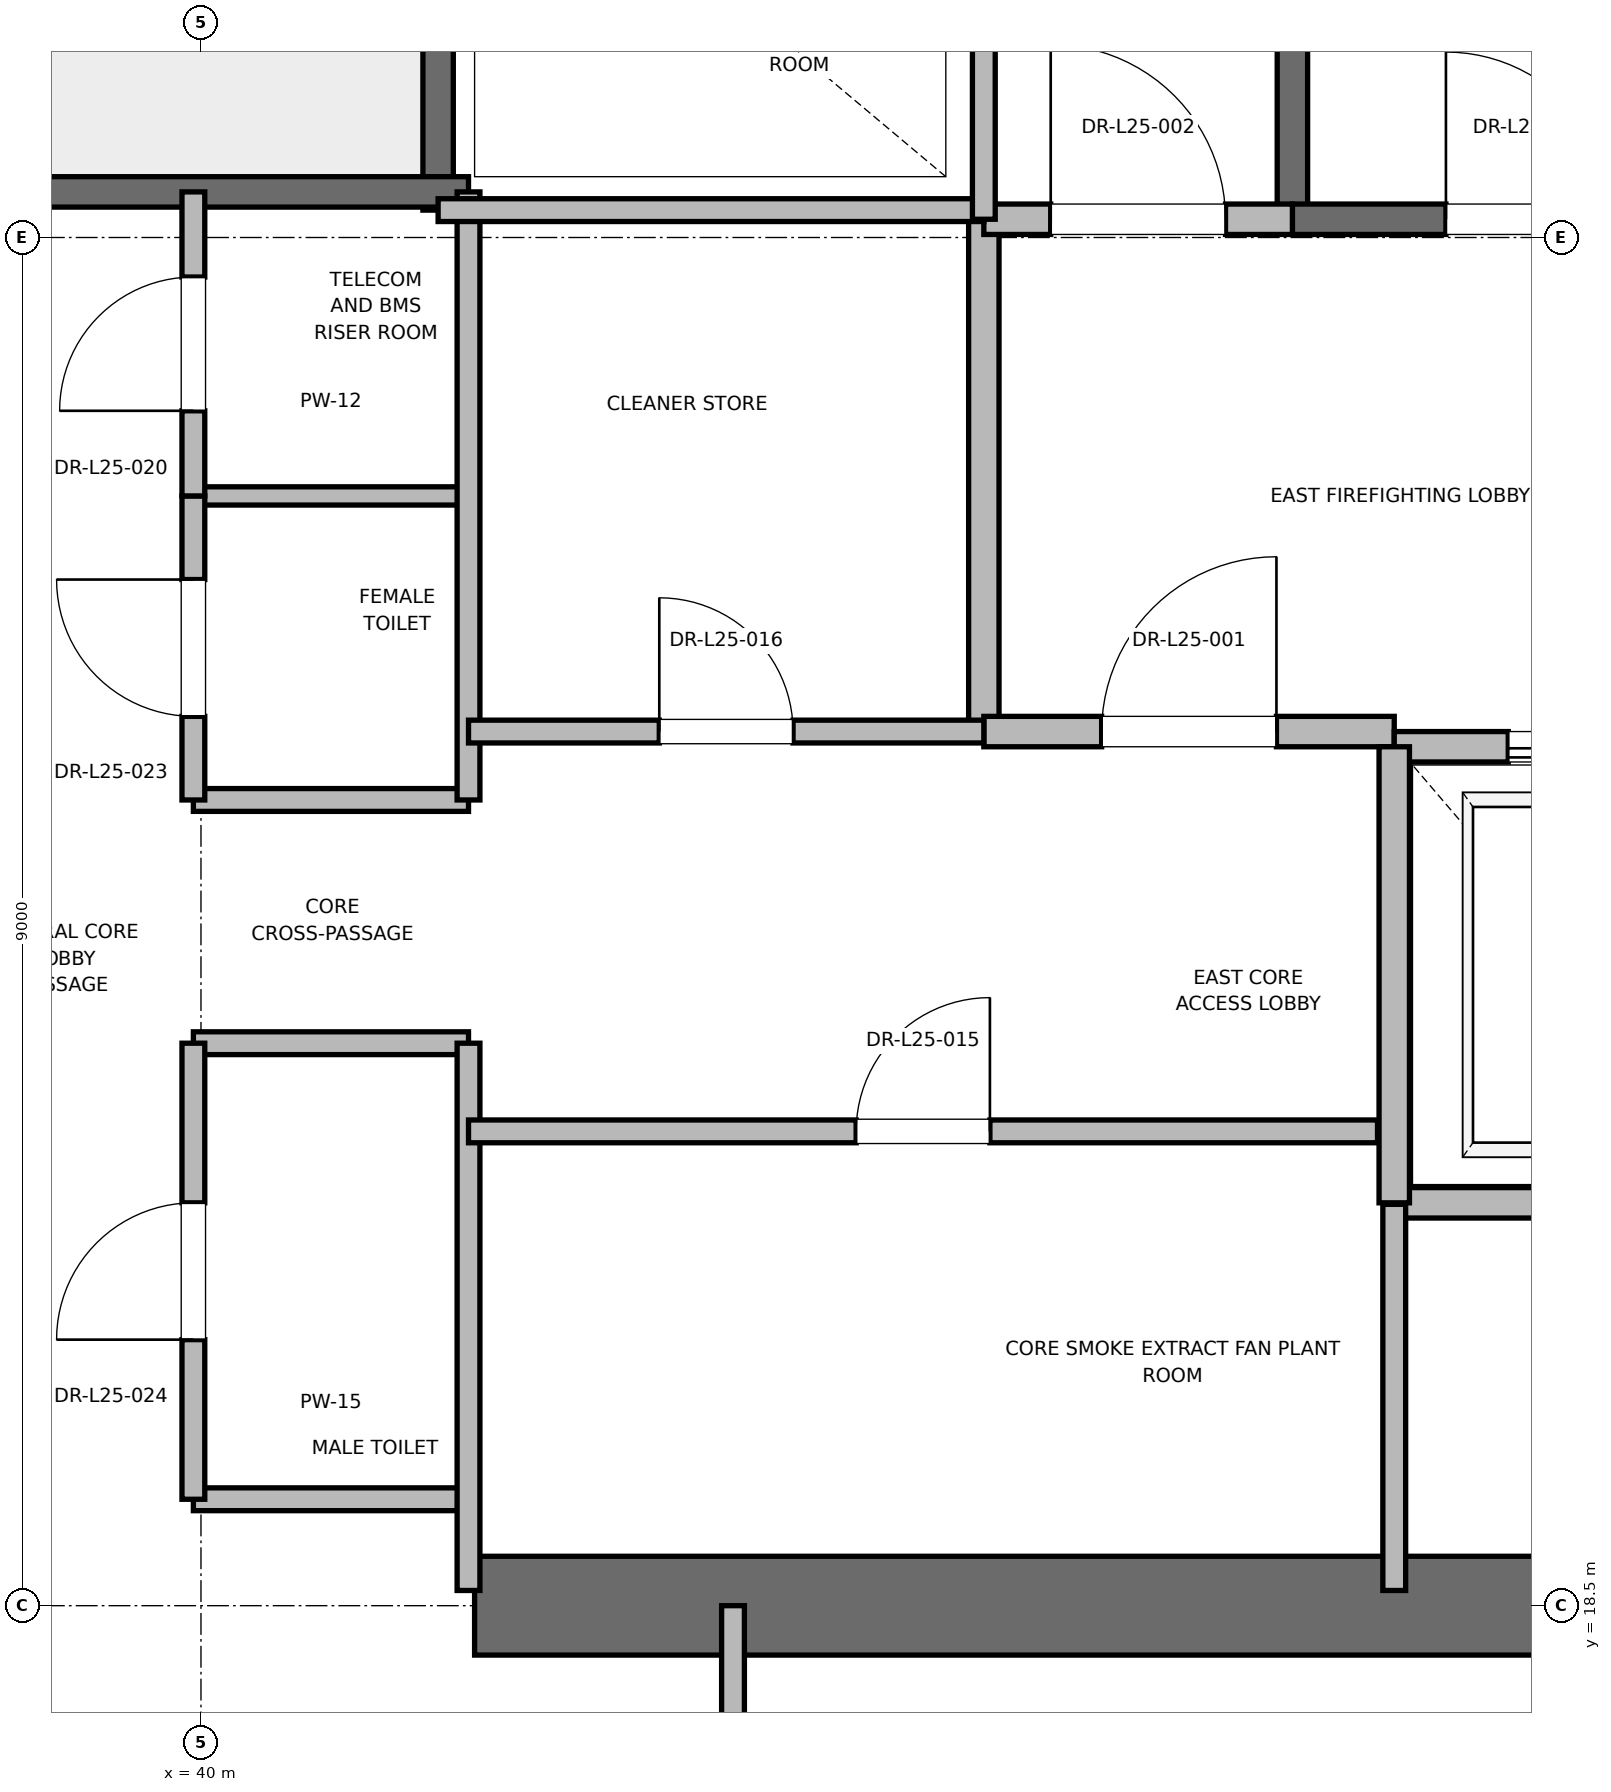
"""IFC4 building model, lengths in metres.
Left out: names, types, materials, properties, quantities, classifications, styles, units other than length and angle.
Written with IfcOpenShell. Run it as: python <this file> out.ifc"""

import sys

from ifc_helpers import new_model, si_unit, direction, frame, frame_2d, origin, place, context, subcontext, project, spatial, rectangle, extrude, element, fill, save


model = new_model("IFC4")
c1 = context("Model", 3, precision=1e-05, world=origin(), true_north=direction((0.0, 1.0)))
c2 = subcontext(c1, "Body", "Model", "MODEL_VIEW")
j1 = project(units=[si_unit("LENGTHUNIT", "METRE"), si_unit("PLANEANGLEUNIT", "RADIAN")], contexts=[c1])
p1 = place(None, origin())
s1 = spatial("IfcSite", under=j1, at=p1, CompositionType="ELEMENT")
p2 = place(p1, origin())
s2 = spatial("IfcBuilding", under=s1, at=p2, CompositionType="ELEMENT")
p3 = place(p2, frame((0.0, 0.0, 107.6)))
s3 = spatial("IfcBuildingStorey", under=s2, at=p3, CompositionType="ELEMENT", Elevation=107.6)
p4 = place(p3, frame((41.8, 18.5, 0.0), z_axis=(0.0, 0.0, 1.0), x_axis=(1.0, 0.0, 0.0)))
e1 = element("IfcWall", 1, at=p4, inside=s3, PredefinedType="SHEAR", context=c2, shape_type="SweptSolid", body=[
    extrude(rectangle(XDim=9.2, YDim=0.65, at=frame_2d((4.6, 0.0))), origin(), (0.0, 0.0, 1.0), 5.1),
])
p5 = place(p3, frame((47.18, 27.62, 0.0), z_axis=(0.0, 0.0, 1.0), x_axis=(0.0, 1.0, 0.0)))
e2 = element("IfcWall", 2, at=p5, inside=s3, PredefinedType="SOLIDWALL", context=c2, shape_type="SweptSolid", body=[
    extrude(rectangle(XDim=8.18, YDim=0.2, at=frame_2d((4.09, 0.0))), origin(), (0.0, 0.0, 1.0), 5.1),
])
p6 = place(p3, frame((47.18, 27.62, 0.0), z_axis=(0.0, 0.0, 1.0), x_axis=(1.0, 0.0, 0.0)))
e3 = element("IfcWall", 3, at=p6, inside=s3, PredefinedType="SOLIDWALL", context=c2, shape_type="SweptSolid", body=[
    extrude(rectangle(XDim=3.12, YDim=0.2, at=frame_2d((1.56, 0.0))), origin(), (0.0, 0.0, 1.0), 5.1),
])
p7 = place(p6, frame((1.01, 0.0, 0.0)))
e4 = element("IfcOpeningElement", 4, at=p7, cuts=e3, PredefinedType="OPENING", context=c2, shape_type="SweptSolid", body=[
    extrude(rectangle(XDim=1.1, YDim=2.15, at=frame_2d((0.55, 1.075))), frame((0.0, 0.1, 0.0), z_axis=(0.0, -1.0, 0.0), x_axis=(1.0, 0.0, 0.0)), (0.0, 0.0, 1.0), 0.2),
])
p8 = place(p3, frame((41.56, 27.68, 0.0), z_axis=(0.0, 0.0, 1.0), x_axis=(0.0, 1.0, 0.0)))
e5 = element("IfcWall", 5, at=p8, inside=s3, PredefinedType="SOLIDWALL", context=c2, shape_type="SweptSolid", body=[
    extrude(rectangle(XDim=8.57, YDim=0.2, at=frame_2d((4.285, 0.0))), origin(), (0.0, 0.0, 1.0), 5.1),
])
p9 = place(p3, frame((38.44, 27.8, 0.0), z_axis=(0.0, 0.0, 1.0), x_axis=(1.0, 0.0, 0.0)))
e6 = element("IfcWall", 6, at=p9, inside=s3, PredefinedType="SOLIDWALL", context=c2, shape_type="SweptSolid", body=[
    extrude(rectangle(XDim=3.32, YDim=0.2, at=frame_2d((1.66, 0.0))), origin(), (0.0, 0.0, 1.0), 5.1),
])
p10 = place(p3, frame((45.15, 24.25, 0.0), z_axis=(0.0, 0.0, 1.0), x_axis=(0.0, 1.0, 0.0)))
e7 = element("IfcWall", 7, at=p10, inside=s3, PredefinedType="PARTITIONING", context=c2, shape_type="SweptSolid", body=[
    extrude(rectangle(XDim=3.37, YDim=0.2, at=frame_2d((1.685, 0.0))), origin(), (0.0, 0.0, 1.0), 5.1),
])
p11 = place(p3, frame((45.15, 24.25, 0.0), z_axis=(0.0, 0.0, 1.0), x_axis=(1.0, 0.0, 0.0)))
e8 = element("IfcWall", 8, at=p11, inside=s3, PredefinedType="PARTITIONING", context=c2, shape_type="SweptSolid", body=[
    extrude(rectangle(XDim=2.7, YDim=0.2, at=frame_2d((1.35, 0.0))), origin(), (0.0, 0.0, 1.0), 5.1),
])
p12 = place(p11, frame((0.775, 0.0, 0.0)))
e9 = element("IfcOpeningElement", 9, at=p12, cuts=e8, PredefinedType="OPENING", context=c2, shape_type="SweptSolid", body=[
    extrude(rectangle(XDim=1.15, YDim=2.2, at=frame_2d((0.575, 1.1))), frame((0.0, 0.1, 0.0), z_axis=(0.0, -1.0, 0.0), x_axis=(1.0, 0.0, 0.0)), (0.0, 0.0, 1.0), 0.2),
])
p13 = place(p3, frame((45.15, 27.62, 0.0), z_axis=(0.0, 0.0, 1.0), x_axis=(1.0, 0.0, 0.0)))
e10 = element("IfcWall", 10, at=p13, inside=s3, PredefinedType="PARTITIONING", context=c2, shape_type="SweptSolid", body=[
    extrude(rectangle(XDim=2.03, YDim=0.2, at=frame_2d((1.015, 0.0))), origin(), (0.0, 0.0, 1.0), 5.1),
])
p14 = place(p13, frame((0.44, 0.0, 0.0)))
e11 = element("IfcOpeningElement", 11, at=p14, cuts=e10, PredefinedType="OPENING", context=c2, shape_type="SweptSolid", body=[
    extrude(rectangle(XDim=1.15, YDim=2.2, at=frame_2d((0.575, 1.1))), frame((0.0, 0.1, 0.0), z_axis=(0.0, -1.0, 0.0), x_axis=(1.0, 0.0, 0.0)), (0.0, 0.0, 1.0), 0.2),
])
p15 = place(p3, frame((47.85, 21.15, 0.0), z_axis=(0.0, 0.0, 1.0), x_axis=(1.0, 0.0, 0.0)))
e12 = element("IfcWall", 12, at=p15, inside=s3, PredefinedType="SOLIDWALL", context=c2, shape_type="SweptSolid", body=[
    extrude(rectangle(XDim=2.6, YDim=0.2, at=frame_2d((1.3, 0.0))), origin(), (0.0, 0.0, 1.0), 5.1),
])
p16 = place(p3, frame((50.45, 24.15, 0.0), z_axis=(0.0, 0.0, 1.0), x_axis=(-1.0, 0.0, 0.0)))
e13 = element("IfcWall", 13, at=p16, inside=s3, PredefinedType="SOLIDWALL", context=c2, shape_type="SweptSolid", body=[
    extrude(rectangle(XDim=2.6, YDim=0.2, at=frame_2d((1.3, 0.0))), origin(), (0.0, 0.0, 1.0), 3.88),
])
p17 = place(p16, frame((0.75, 0.0, 0.0)))
e14 = element("IfcOpeningElement", 14, at=p17, cuts=e13, PredefinedType="OPENING", context=c2, shape_type="SweptSolid", body=[
    extrude(rectangle(XDim=1.1, YDim=2.2, at=frame_2d((0.55, 1.1))), frame((0.0, 0.1, 0.0), z_axis=(0.0, -1.0, 0.0), x_axis=(1.0, 0.0, 0.0)), (0.0, 0.0, 1.0), 0.2),
])
p18 = place(p3, frame((47.85, 24.15, 0.0), z_axis=(0.0, 0.0, 1.0), x_axis=(0.0, -1.0, 0.0)))
e15 = element("IfcWall", 15, at=p18, inside=s3, PredefinedType="SOLIDWALL", context=c2, shape_type="SweptSolid", body=[
    extrude(rectangle(XDim=3.0, YDim=0.2, at=frame_2d((1.5, 0.0))), origin(), (0.0, 0.0, 1.0), 5.1),
])
for number, where, z_axis, x_axis in (
    (16, (39.95, 19.2, 0.0), (0.0, 0.0, 1.0), (1.0, 0.0, 0.0)),
    (17, (39.95, 22.2, 0.0), (0.0, 0.0, 1.0), (1.0, 0.0, 0.0)),
    (18, (39.95, 23.8, 0.0), (0.0, 0.0, 1.0), (1.0, 0.0, 0.0)),
):
    element("IfcWall", number, at=place(p3, frame(where, z_axis=z_axis, x_axis=x_axis)), inside=s3, PredefinedType="PARTITIONING", context=c2, shape_type="SweptSolid", body=[
        extrude(rectangle(XDim=1.81, YDim=0.15, at=frame_2d((0.905, 0.0))), origin(), (0.0, 0.0, 1.0), 2.85),
    ])
p19 = place(p3, frame((39.95, 25.8, 0.0), z_axis=(0.0, 0.0, 1.0), x_axis=(1.0, 0.0, 0.0)))
e19 = element("IfcWall", 19, at=p19, inside=s3, PredefinedType="PARTITIONING", context=c2, shape_type="SweptSolid", body=[
    extrude(rectangle(XDim=1.81, YDim=0.12, at=frame_2d((0.905, 0.0))), origin(), (0.0, 0.0, 1.0), 2.85),
])
p20 = place(p3, frame((41.76, 18.6, 0.0), z_axis=(0.0, 0.0, 1.0), x_axis=(0.0, 1.0, 0.0)))
e20 = element("IfcWall", 20, at=p20, inside=s3, PredefinedType="PARTITIONING", context=c2, shape_type="SweptSolid", body=[
    extrude(rectangle(XDim=3.6, YDim=0.15, at=frame_2d((1.8, 0.0))), origin(), (0.0, 0.0, 1.0), 2.85),
])
p21 = place(p3, frame((41.76, 23.8, 0.0), z_axis=(0.0, 0.0, 1.0), x_axis=(0.0, 1.0, 0.0)))
e21 = element("IfcWall", 21, at=p21, inside=s3, PredefinedType="PARTITIONING", context=c2, shape_type="SweptSolid", body=[
    extrude(rectangle(XDim=4.0, YDim=0.15, at=frame_2d((2.0, 0.0))), origin(), (0.0, 0.0, 1.0), 2.85),
])
p22 = place(p3, frame((39.95, 19.2, 0.0), z_axis=(0.0, 0.0, 1.0), x_axis=(0.0, 1.0, 0.0)))
e22 = element("IfcWall", 22, at=p22, inside=s3, PredefinedType="PARTITIONING", context=c2, shape_type="SweptSolid", body=[
    extrude(rectangle(XDim=3.0, YDim=0.15, at=frame_2d((1.5, 0.0))), origin(), (0.0, 0.0, 1.0), 2.85),
])
p23 = place(p22, frame((1.05, 0.0, 0.0)))
e23 = element("IfcOpeningElement", 23, at=p23, cuts=e22, PredefinedType="OPENING", context=c2, shape_type="SweptSolid", body=[
    extrude(rectangle(XDim=0.9, YDim=2.1, at=frame_2d((0.45, 1.05))), frame((0.0, 0.075, 0.0), z_axis=(0.0, -1.0, 0.0), x_axis=(1.0, 0.0, 0.0)), (0.0, 0.0, 1.0), 0.15),
])
p24 = place(p3, frame((39.95, 23.8, 0.0), z_axis=(0.0, 0.0, 1.0), x_axis=(0.0, 1.0, 0.0)))
e24 = element("IfcWall", 24, at=p24, inside=s3, PredefinedType="PARTITIONING", context=c2, shape_type="SweptSolid", body=[
    extrude(rectangle(XDim=2.0, YDim=0.15, at=frame_2d((1.0, 0.0))), origin(), (0.0, 0.0, 1.0), 2.85),
])
p25 = place(p24, frame((0.55, 0.0, 0.0)))
e25 = element("IfcOpeningElement", 25, at=p25, cuts=e24, PredefinedType="OPENING", context=c2, shape_type="SweptSolid", body=[
    extrude(rectangle(XDim=0.9, YDim=2.1, at=frame_2d((0.45, 1.05))), frame((0.0, 0.075, 0.0), z_axis=(0.0, -1.0, 0.0), x_axis=(1.0, 0.0, 0.0)), (0.0, 0.0, 1.0), 0.15),
])
p26 = place(p3, frame((39.95, 25.8, 0.0), z_axis=(0.0, 0.0, 1.0), x_axis=(0.0, 1.0, 0.0)))
e26 = element("IfcWall", 26, at=p26, inside=s3, PredefinedType="PARTITIONING", context=c2, shape_type="SweptSolid", body=[
    extrude(rectangle(XDim=2.0, YDim=0.15, at=frame_2d((1.0, 0.0))), origin(), (0.0, 0.0, 1.0), 2.85),
])
p27 = place(p26, frame((0.56, 0.0, 0.0)))
e27 = element("IfcOpeningElement", 27, at=p27, cuts=e26, PredefinedType="OPENING", context=c2, shape_type="SweptSolid", body=[
    extrude(rectangle(XDim=0.88, YDim=2.1, at=frame_2d((0.44, 1.05))), frame((0.0, 0.075, 0.0), z_axis=(0.0, -1.0, 0.0), x_axis=(1.0, 0.0, 0.0)), (0.0, 0.0, 1.0), 0.15),
])
p28 = place(p3, frame((41.56, 27.68, 0.0), z_axis=(0.0, 0.0, 1.0), x_axis=(1.0, 0.0, 0.0)))
e28 = element("IfcWall", 28, at=p28, inside=s3, PredefinedType="PARTITIONING", context=c2, shape_type="SweptSolid", body=[
    extrude(rectangle(XDim=3.59, YDim=0.15, at=frame_2d((1.795, 0.0))), origin(), (0.0, 0.0, 1.0), 2.85),
])
p29 = place(p3, frame((47.85, 18.6, 0.0), z_axis=(0.0, 0.0, 1.0), x_axis=(0.0, 1.0, 0.0)))
e29 = element("IfcWall", 29, at=p29, inside=s3, PredefinedType="PARTITIONING", context=c2, shape_type="SweptSolid", body=[
    extrude(rectangle(XDim=2.54, YDim=0.15, at=frame_2d((1.27, 0.0))), origin(), (0.0, 0.0, 1.0), 2.85),
])
p30 = place(p3, frame((41.76, 21.62, 0.0), z_axis=(0.0, 0.0, 1.0), x_axis=(1.0, 0.0, 0.0)))
e30 = element("IfcWall", 30, at=p30, inside=s3, PredefinedType="PARTITIONING", context=c2, shape_type="SweptSolid", body=[
    extrude(rectangle(XDim=5.98, YDim=0.15, at=frame_2d((2.99, 0.0))), origin(), (0.0, 0.0, 1.0), 2.85),
])
p31 = place(p30, frame((2.55, 0.0, 0.0)))
e31 = element("IfcOpeningElement", 31, at=p31, cuts=e30, PredefinedType="OPENING", context=c2, shape_type="SweptSolid", body=[
    extrude(rectangle(XDim=0.88, YDim=2.1, at=frame_2d((0.44, 1.05))), frame((0.0, 0.075, 0.0), z_axis=(0.0, -1.0, 0.0), x_axis=(1.0, 0.0, 0.0)), (0.0, 0.0, 1.0), 0.15),
])
p32 = place(p3, frame((41.76, 24.25, 0.0), z_axis=(0.0, 0.0, 1.0), x_axis=(1.0, 0.0, 0.0)))
e32 = element("IfcWall", 32, at=p32, inside=s3, PredefinedType="PARTITIONING", context=c2, shape_type="SweptSolid", body=[
    extrude(rectangle(XDim=3.39, YDim=0.15, at=frame_2d((1.695, 0.0))), origin(), (0.0, 0.0, 1.0), 2.85),
])
p33 = place(p32, frame((1.255, 0.0, 0.0)))
e33 = element("IfcOpeningElement", 33, at=p33, cuts=e32, PredefinedType="OPENING", context=c2, shape_type="SweptSolid", body=[
    extrude(rectangle(XDim=0.88, YDim=2.1, at=frame_2d((0.44, 1.05))), frame((0.0, 0.075, 0.0), z_axis=(0.0, -1.0, 0.0), x_axis=(1.0, 0.0, 0.0)), (0.0, 0.0, 1.0), 0.15),
])
p34 = place(p3, frame((45.15, 27.62, 0.0), z_axis=(0.0, 0.0, 1.0), x_axis=(0.0, 1.0, 0.0)))
e34 = element("IfcWall", 34, at=p34, inside=s3, PredefinedType="PARTITIONING", context=c2, shape_type="SweptSolid", body=[
    extrude(rectangle(XDim=3.1, YDim=0.15, at=frame_2d((1.55, 0.0))), origin(), (0.0, 0.0, 1.0), 2.85),
])
p35 = place(p3, frame((43.5, 15.8, 0.0), z_axis=(0.0, 0.0, 1.0), x_axis=(0.0, 1.0, 0.0)))
e35 = element("IfcWall", 35, at=p35, inside=s3, PredefinedType="PARTITIONING", context=c2, shape_type="SweptSolid", body=[
    extrude(rectangle(XDim=2.7, YDim=0.15, at=frame_2d((1.35, 0.0))), origin(), (0.0, 0.0, 1.0), 2.85),
])
p36 = place(p35, frame((0.875, 0.0, 0.0)))
e36 = element("IfcOpeningElement", 36, at=p36, cuts=e35, PredefinedType="OPENING", context=c2, shape_type="SweptSolid", body=[
    extrude(rectangle(XDim=0.95, YDim=2.15, at=frame_2d((0.475, 1.075))), frame((0.0, 0.075, 0.0), z_axis=(0.0, -1.0, 0.0), x_axis=(1.0, 0.0, 0.0)), (0.0, 0.0, 1.0), 0.15),
])
p37 = place(p7, origin())
e37 = element("IfcDoor", 37, at=p37, inside=s3, OperationType="SINGLE_SWING_LEFT", PredefinedType="DOOR", context=c2, shape_type="SweptSolid", body=[
    extrude(rectangle(XDim=1.1, YDim=2.15, at=frame_2d((0.55, 1.075))), frame((0.0, 0.025, 0.0), z_axis=(0.0, -1.0, 0.0), x_axis=(1.0, 0.0, 0.0)), (0.0, 0.0, 1.0), 0.05),
])
fill(e4, e37)
p38 = place(p12, origin())
e38 = element("IfcDoor", 38, at=p38, inside=s3, OperationType="SINGLE_SWING_RIGHT", PredefinedType="DOOR", context=c2, shape_type="SweptSolid", body=[
    extrude(rectangle(XDim=1.15, YDim=2.2, at=frame_2d((0.575, 1.1))), frame((0.0, 0.025, 0.0), z_axis=(0.0, -1.0, 0.0), x_axis=(1.0, 0.0, 0.0)), (0.0, 0.0, 1.0), 0.05),
])
fill(e9, e38)
p39 = place(p14, origin())
e39 = element("IfcDoor", 39, at=p39, inside=s3, OperationType="SINGLE_SWING_LEFT", PredefinedType="DOOR", context=c2, shape_type="SweptSolid", body=[
    extrude(rectangle(XDim=1.15, YDim=2.2, at=frame_2d((0.575, 1.1))), frame((0.0, 0.025, 0.0), z_axis=(0.0, -1.0, 0.0), x_axis=(1.0, 0.0, 0.0)), (0.0, 0.0, 1.0), 0.05),
])
fill(e11, e39)
p40 = place(p17, origin())
e40 = element("IfcDoor", 40, at=p40, inside=s3, OperationType="SLIDING_TO_RIGHT", PredefinedType="DOOR", context=c2, shape_type="SweptSolid", body=[
    extrude(rectangle(XDim=1.1, YDim=2.2, at=frame_2d((0.55, 1.1))), frame((0.0, 0.025, 0.0), z_axis=(0.0, -1.0, 0.0), x_axis=(1.0, 0.0, 0.0)), (0.0, 0.0, 1.0), 0.05),
])
fill(e14, e40)
p41 = place(p23, origin())
e41 = element("IfcDoor", 41, at=p41, inside=s3, OperationType="SINGLE_SWING_LEFT", PredefinedType="DOOR", context=c2, shape_type="SweptSolid", body=[
    extrude(rectangle(XDim=0.9, YDim=2.1, at=frame_2d((0.45, 1.05))), frame((0.0, 0.025, 0.0), z_axis=(0.0, -1.0, 0.0), x_axis=(1.0, 0.0, 0.0)), (0.0, 0.0, 1.0), 0.05),
])
fill(e23, e41)
p42 = place(p25, origin())
e42 = element("IfcDoor", 42, at=p42, inside=s3, OperationType="SINGLE_SWING_RIGHT", PredefinedType="DOOR", context=c2, shape_type="SweptSolid", body=[
    extrude(rectangle(XDim=0.9, YDim=2.1, at=frame_2d((0.45, 1.05))), frame((0.0, 0.025, 0.0), z_axis=(0.0, -1.0, 0.0), x_axis=(1.0, 0.0, 0.0)), (0.0, 0.0, 1.0), 0.05),
])
fill(e25, e42)
p43 = place(p27, origin())
e43 = element("IfcDoor", 43, at=p43, inside=s3, OperationType="SINGLE_SWING_LEFT", PredefinedType="DOOR", context=c2, shape_type="SweptSolid", body=[
    extrude(rectangle(XDim=0.88, YDim=2.1, at=frame_2d((0.44, 1.05))), frame((0.0, 0.025, 0.0), z_axis=(0.0, -1.0, 0.0), x_axis=(1.0, 0.0, 0.0)), (0.0, 0.0, 1.0), 0.05),
])
fill(e27, e43)
p44 = place(p31, origin())
e44 = element("IfcDoor", 44, at=p44, inside=s3, OperationType="SINGLE_SWING_RIGHT", PredefinedType="DOOR", context=c2, shape_type="SweptSolid", body=[
    extrude(rectangle(XDim=0.88, YDim=2.1, at=frame_2d((0.44, 1.05))), frame((0.0, 0.025, 0.0), z_axis=(0.0, -1.0, 0.0), x_axis=(1.0, 0.0, 0.0)), (0.0, 0.0, 1.0), 0.05),
])
fill(e31, e44)
p45 = place(p33, origin())
e45 = element("IfcDoor", 45, at=p45, inside=s3, OperationType="SINGLE_SWING_LEFT", PredefinedType="DOOR", context=c2, shape_type="SweptSolid", body=[
    extrude(rectangle(XDim=0.88, YDim=2.1, at=frame_2d((0.44, 1.05))), frame((0.0, 0.025, 0.0), z_axis=(0.0, -1.0, 0.0), x_axis=(1.0, 0.0, 0.0)), (0.0, 0.0, 1.0), 0.05),
])
fill(e33, e45)
save(model, sys.argv[1])
